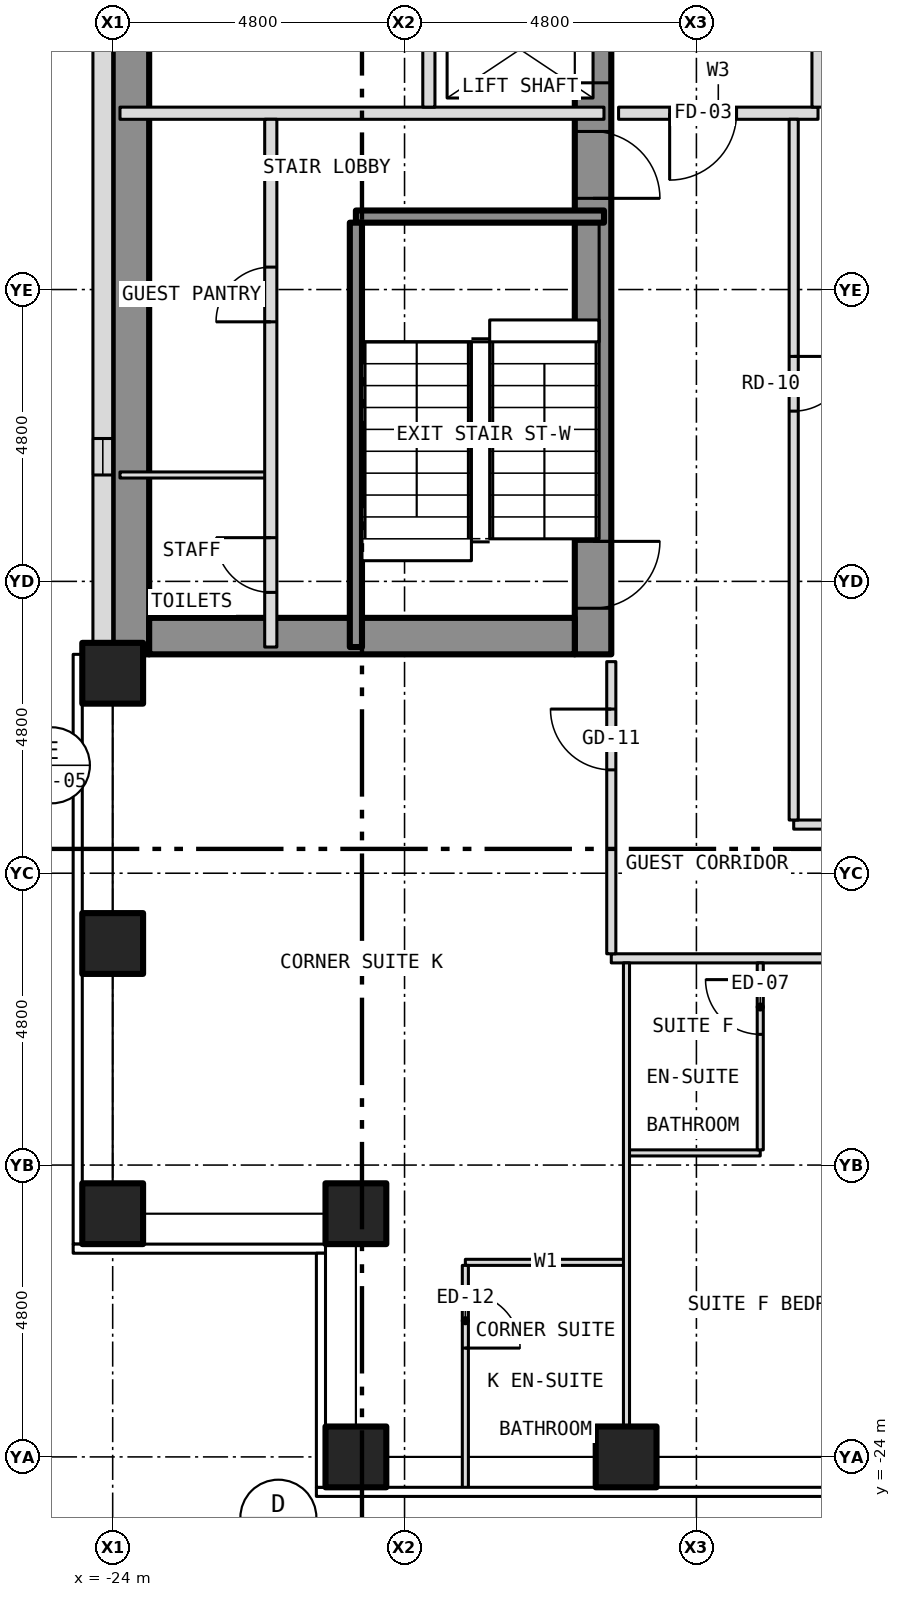
"""IFC4 building model, lengths in metres.
Left out: names, types, materials, properties, quantities, classifications, styles, units other than length and angle.
Written with IfcOpenShell. Run it as: python <this file> out.ifc"""

import sys

from ifc_helpers import new_model, si_unit, direction, frame, frame_2d, origin, origin_2d, place, context, subcontext, project, spatial, rectangle, hollow_rectangle, extrude, element, fill, save


model = new_model("IFC4")
c1 = context("Model", 3, precision=1e-05, world=origin(), true_north=direction((0.0, 1.0)))
c2 = subcontext(c1, "Body", "Model", "MODEL_VIEW")
j1 = project(units=[si_unit("LENGTHUNIT", "METRE"), si_unit("PLANEANGLEUNIT", "RADIAN")], contexts=[c1])
p1 = place(None, origin())
s1 = spatial("IfcSite", under=j1, at=p1, CompositionType="ELEMENT")
p2 = place(p1, origin())
s2 = spatial("IfcBuilding", under=s1, at=p2, CompositionType="ELEMENT")
p3 = place(p2, frame((0.0, 0.0, 42.5)))
s3 = spatial("IfcBuildingStorey", under=s2, at=p3, CompositionType="ELEMENT", Elevation=42.5)
for number, where, z_axis, x_axis in (
    (1, (-20.0, -24.0, -0.15), (0.0, 0.0, 1.0), (1.0, 0.0, 0.0)),
    (2, (-15.556, -24.0, -0.15), (0.0, 0.0, 1.0), (1.0, 0.0, 0.0)),
    (3, (-24.0, -20.0, -0.15), (0.0, 0.0, 1.0), (1.0, 0.0, 0.0)),
    (4, (-24.0, -15.556, -0.15), (0.0, 0.0, 1.0), (1.0, 0.0, 0.0)),
    (5, (-24.0, -11.111, -0.15), (0.0, 0.0, 1.0), (1.0, 0.0, 0.0)),
    (6, (-20.0, -20.0, -0.15), (0.0, 0.0, 1.0), (1.0, 0.0, 0.0)),
):
    element("IfcColumn", number, at=place(p3, frame(where, z_axis=z_axis, x_axis=x_axis)), inside=s3, PredefinedType="COLUMN", context=c2, shape_type="SweptSolid", body=[
        extrude(hollow_rectangle(XDim=1.0, YDim=1.0, WallThickness=0.06, at=origin_2d()), origin(), (0.0, 0.0, 1.0), 3.5),
    ])
p4 = place(p3, frame((-16.1, -10.8, 0.0), z_axis=(0.0, 0.0, 1.0), x_axis=(0.0, 1.0, 0.0)))
e7 = element("IfcWall", 7, at=p4, inside=s3, PredefinedType="SHEAR", context=c2, shape_type="SweptSolid", body=[
    extrude(rectangle(XDim=21.6, YDim=0.6, at=frame_2d((10.8, 0.0))), origin(), (0.0, 0.0, 1.0), 3.25),
])
p5 = place(p4, frame((9.4, 0.0, 0.0)))
e8 = element("IfcOpeningElement", 8, at=p5, cuts=e7, PredefinedType="OPENING", context=c2, shape_type="SweptSolid", body=[
    extrude(rectangle(XDim=1.1, YDim=2.1, at=frame_2d((0.55, 1.05))), frame((0.0, 0.312, 0.0), z_axis=(0.0, -1.0, 0.0), x_axis=(1.0, 0.0, 0.0)), (0.0, 0.0, 1.0), 0.624),
])
p6 = place(p4, frame((11.5, 0.0, 0.0)))
e9 = element("IfcOpeningElement", 9, at=p6, cuts=e7, PredefinedType="OPENING", context=c2, shape_type="SweptSolid", body=[
    extrude(rectangle(XDim=1.1, YDim=2.1, at=frame_2d((0.55, 1.05))), frame((0.0, 0.312, 0.0), z_axis=(0.0, -1.0, 0.0), x_axis=(1.0, 0.0, 0.0)), (0.0, 0.0, 1.0), 0.624),
])
p7 = place(p4, frame((13.6, 0.0, 0.0)))
e10 = element("IfcOpeningElement", 10, at=p7, cuts=e7, PredefinedType="OPENING", context=c2, shape_type="SweptSolid", body=[
    extrude(rectangle(XDim=1.1, YDim=2.1, at=frame_2d((0.55, 1.05))), frame((0.0, 0.312, 0.0), z_axis=(0.0, -1.0, 0.0), x_axis=(1.0, 0.0, 0.0)), (0.0, 0.0, 1.0), 0.624),
])
p8 = place(p4, frame((15.7, 0.0, 0.0)))
e11 = element("IfcOpeningElement", 11, at=p8, cuts=e7, PredefinedType="OPENING", context=c2, shape_type="SweptSolid", body=[
    extrude(rectangle(XDim=1.1, YDim=2.1, at=frame_2d((0.55, 1.05))), frame((0.0, 0.312, 0.0), z_axis=(0.0, -1.0, 0.0), x_axis=(1.0, 0.0, 0.0)), (0.0, 0.0, 1.0), 0.624),
])
p9 = place(p4, frame((17.8, 0.0, 0.0)))
e12 = element("IfcOpeningElement", 12, at=p9, cuts=e7, PredefinedType="OPENING", context=c2, shape_type="SweptSolid", body=[
    extrude(rectangle(XDim=1.1, YDim=2.1, at=frame_2d((0.55, 1.05))), frame((0.0, 0.312, 0.0), z_axis=(0.0, -1.0, 0.0), x_axis=(1.0, 0.0, 0.0)), (0.0, 0.0, 1.0), 0.624),
])
p10 = place(p4, frame((0.758, 0.0, 0.0)))
e13 = element("IfcOpeningElement", 13, at=p10, cuts=e7, PredefinedType="OPENING", context=c2, shape_type="SweptSolid", body=[
    extrude(rectangle(XDim=1.1, YDim=2.1, at=frame_2d((0.55, 1.05))), frame((0.0, 0.312, 0.0), z_axis=(0.0, -1.0, 0.0), x_axis=(1.0, 0.0, 0.0)), (0.0, 0.0, 1.0), 0.624),
])
p11 = place(p4, frame((7.5, 0.0, 0.0)))
e14 = element("IfcOpeningElement", 14, at=p11, cuts=e7, PredefinedType="OPENING", context=c2, shape_type="SweptSolid", body=[
    extrude(rectangle(XDim=1.1, YDim=2.1, at=frame_2d((0.55, 1.05))), frame((0.0, 0.312, 0.0), z_axis=(0.0, -1.0, 0.0), x_axis=(1.0, 0.0, 0.0)), (0.0, 0.0, 1.0), 0.624),
])
p12 = place(p3, frame((-23.7, -10.8, 0.0), z_axis=(0.0, 0.0, 1.0), x_axis=(0.0, 1.0, 0.0)))
e15 = element("IfcWall", 15, at=p12, inside=s3, PredefinedType="SHEAR", context=c2, shape_type="SweptSolid", body=[
    extrude(rectangle(XDim=21.6, YDim=0.6, at=frame_2d((10.8, 0.0))), origin(), (0.0, 0.0, 1.0), 3.25),
])
p13 = place(p3, frame((-23.4, -10.5, 0.0), z_axis=(0.0, 0.0, 1.0), x_axis=(1.0, 0.0, 0.0)))
e16 = element("IfcWall", 16, at=p13, inside=s3, PredefinedType="SHEAR", context=c2, shape_type="SweptSolid", body=[
    extrude(rectangle(XDim=7.0, YDim=0.6, at=frame_2d((3.5, 0.0))), origin(), (0.0, 0.0, 1.0), 3.25),
])
p14 = place(p3, frame((-24.163, 10.8, 0.0), z_axis=(0.0, 0.0, 1.0), x_axis=(0.0, -1.0, 0.0)))
e17 = element("IfcWall", 17, at=p14, inside=s3, PredefinedType="SOLIDWALL", context=c2, shape_type="SweptSolid", body=[
    extrude(rectangle(XDim=21.6, YDim=0.325, at=frame_2d((10.8, 0.0))), origin(), (0.0, 0.0, 1.0), 3.5),
])
p15 = place(p14, frame((18.05, 0.0, 1.0)))
e18 = element("IfcOpeningElement", 18, at=p15, cuts=e17, PredefinedType="OPENING", context=c2, shape_type="SweptSolid", body=[
    extrude(rectangle(XDim=0.6, YDim=1.5, at=frame_2d((0.3, 0.75))), frame((0.0, 0.175, 0.0), z_axis=(0.0, -1.0, 0.0), x_axis=(1.0, 0.0, 0.0)), (0.0, 0.0, 1.0), 0.349),
])
p16 = place(p3, frame((-18.2, -20.8, 0.0), z_axis=(0.0, 0.0, 1.0), x_axis=(1.0, 0.0, 0.0)))
e19 = element("IfcWall", 19, at=p16, inside=s3, PredefinedType="PARTITIONING", context=c2, shape_type="SweptSolid", body=[
    extrude(rectangle(XDim=2.65, YDim=0.1, at=frame_2d((1.325, 0.0))), origin(), (0.0, 0.0, 1.0), 3.35),
])
p17 = place(p3, frame((-15.55, -19.0, 0.0), z_axis=(0.0, 0.0, 1.0), x_axis=(1.0, 0.0, 0.0)))
e20 = element("IfcWall", 20, at=p17, inside=s3, PredefinedType="PARTITIONING", context=c2, shape_type="SweptSolid", body=[
    extrude(rectangle(XDim=2.2, YDim=0.1, at=frame_2d((1.1, 0.0))), origin(), (0.0, 0.0, 1.0), 3.35),
])
p18 = place(p3, frame((-15.8, -15.8, 0.0), z_axis=(0.0, 0.0, 1.0), x_axis=(1.0, 0.0, 0.0)))
e21 = element("IfcWall", 21, at=p18, inside=s3, PredefinedType="PARTITIONING", context=c2, shape_type="SweptSolid", body=[
    extrude(rectangle(XDim=31.6, YDim=0.15, at=frame_2d((15.8, 0.0))), origin(), (0.0, 0.0, 1.0), 3.35),
])
p19 = place(p18, frame((6.633, 0.0, 0.0)))
e22 = element("IfcOpeningElement", 22, at=p19, cuts=e21, PredefinedType="OPENING", context=c2, shape_type="SweptSolid", body=[
    extrude(rectangle(XDim=1.0, YDim=2.1, at=frame_2d((0.5, 1.05))), frame((0.0, 0.087, 0.0), z_axis=(0.0, -1.0, 0.0), x_axis=(1.0, 0.0, 0.0)), (0.0, 0.0, 1.0), 0.174),
])
p20 = place(p18, frame((11.956, 0.0, 0.0)))
e23 = element("IfcOpeningElement", 23, at=p20, cuts=e21, PredefinedType="OPENING", context=c2, shape_type="SweptSolid", body=[
    extrude(rectangle(XDim=1.0, YDim=2.1, at=frame_2d((0.5, 1.05))), frame((0.0, 0.087, 0.0), z_axis=(0.0, -1.0, 0.0), x_axis=(1.0, 0.0, 0.0)), (0.0, 0.0, 1.0), 0.174),
])
p21 = place(p18, frame((16.4, 0.0, 0.0)))
e24 = element("IfcOpeningElement", 24, at=p21, cuts=e21, PredefinedType="OPENING", context=c2, shape_type="SweptSolid", body=[
    extrude(rectangle(XDim=1.0, YDim=2.1, at=frame_2d((0.5, 1.05))), frame((0.0, 0.087, 0.0), z_axis=(0.0, -1.0, 0.0), x_axis=(1.0, 0.0, 0.0)), (0.0, 0.0, 1.0), 0.174),
])
p22 = place(p18, frame((21.956, 0.0, 0.0)))
e25 = element("IfcOpeningElement", 25, at=p22, cuts=e21, PredefinedType="OPENING", context=c2, shape_type="SweptSolid", body=[
    extrude(rectangle(XDim=1.0, YDim=2.1, at=frame_2d((0.5, 1.05))), frame((0.0, 0.087, 0.0), z_axis=(0.0, -1.0, 0.0), x_axis=(1.0, 0.0, 0.0)), (0.0, 0.0, 1.0), 0.174),
])
p23 = place(p18, frame((28.623, 0.0, 0.0)))
e26 = element("IfcOpeningElement", 26, at=p23, cuts=e21, PredefinedType="OPENING", context=c2, shape_type="SweptSolid", body=[
    extrude(rectangle(XDim=1.0, YDim=2.1, at=frame_2d((0.5, 1.05))), frame((0.0, 0.087, 0.0), z_axis=(0.0, -1.0, 0.0), x_axis=(1.0, 0.0, 0.0)), (0.0, 0.0, 1.0), 0.174),
])
p24 = place(p3, frame((-12.8, -13.6, 0.0), z_axis=(0.0, 0.0, 1.0), x_axis=(1.0, 0.0, 0.0)))
e27 = element("IfcWall", 27, at=p24, inside=s3, PredefinedType="PARTITIONING", context=c2, shape_type="SweptSolid", body=[
    extrude(rectangle(XDim=25.6, YDim=0.15, at=frame_2d((12.8, 0.0))), origin(), (0.0, 0.0, 1.0), 3.35),
])
p25 = place(p24, frame((12.35, 0.0, 0.0)))
e28 = element("IfcOpeningElement", 28, at=p25, cuts=e27, PredefinedType="OPENING", context=c2, shape_type="SweptSolid", body=[
    extrude(rectangle(XDim=0.9, YDim=2.1, at=frame_2d((0.45, 1.05))), frame((0.0, 0.087, 0.0), z_axis=(0.0, -1.0, 0.0), x_axis=(1.0, 0.0, 0.0)), (0.0, 0.0, 1.0), 0.174),
])
p26 = place(p3, frame((-23.88, -7.85, 0.0), z_axis=(0.0, 0.0, 1.0), x_axis=(1.0, 0.0, 0.0)))
e29 = element("IfcWall", 29, at=p26, inside=s3, PredefinedType="PARTITIONING", context=c2, shape_type="SweptSolid", body=[
    extrude(rectangle(XDim=2.48, YDim=0.1, at=frame_2d((1.24, 0.0))), origin(), (0.0, 0.0, 1.0), 3.25),
])
p27 = place(p3, frame((-20.0, -3.6, 0.0), z_axis=(0.0, 0.0, 1.0), x_axis=(1.0, 0.0, 0.0)))
e30 = element("IfcWall", 30, at=p27, inside=s3, PredefinedType="SHEAR", context=c2, shape_type="SweptSolid", body=[
    extrude(rectangle(XDim=4.08, YDim=0.2, at=frame_2d((2.04, 0.0))), origin(), (0.0, 0.0, 1.0), 3.25),
])
p28 = place(p3, frame((-23.88, -1.9, 0.0), z_axis=(0.0, 0.0, 1.0), x_axis=(1.0, 0.0, 0.0)))
e31 = element("IfcWall", 31, at=p28, inside=s3, PredefinedType="PARTITIONING", context=c2, shape_type="SweptSolid", body=[
    extrude(rectangle(XDim=7.96, YDim=0.2, at=frame_2d((3.98, 0.0))), origin(), (0.0, 0.0, 1.0), 3.25),
])
p29 = place(p3, frame((-15.68, -1.9, 0.0), z_axis=(0.0, 0.0, 1.0), x_axis=(1.0, 0.0, 0.0)))
e32 = element("IfcWall", 32, at=p29, inside=s3, PredefinedType="PARTITIONING", context=c2, shape_type="SweptSolid", body=[
    extrude(rectangle(XDim=3.28, YDim=0.2, at=frame_2d((1.64, 0.0))), origin(), (0.0, 0.0, 1.0), 3.35),
])
p30 = place(p29, frame((0.84, 0.0, 0.0)))
e33 = element("IfcOpeningElement", 33, at=p30, cuts=e32, PredefinedType="OPENING", context=c2, shape_type="SweptSolid", body=[
    extrude(rectangle(XDim=1.1, YDim=2.1, at=frame_2d((0.55, 1.05))), frame((0.0, 0.112, 0.0), z_axis=(0.0, -1.0, 0.0), x_axis=(1.0, 0.0, 0.0)), (0.0, 0.0, 1.0), 0.224),
])
p31 = place(p3, frame((-21.4, -10.68, 0.0), z_axis=(0.0, 0.0, 1.0), x_axis=(0.0, 1.0, 0.0)))
e34 = element("IfcWall", 34, at=p31, inside=s3, PredefinedType="PARTITIONING", context=c2, shape_type="SweptSolid", body=[
    extrude(rectangle(XDim=8.68, YDim=0.2, at=frame_2d((4.34, 0.0))), origin(), (0.0, 0.0, 1.0), 3.25),
])
p32 = place(p31, frame((0.899, 0.0, 0.0)))
e35 = element("IfcOpeningElement", 35, at=p32, cuts=e34, PredefinedType="OPENING", context=c2, shape_type="SweptSolid", body=[
    extrude(rectangle(XDim=0.9, YDim=2.1, at=frame_2d((0.45, 1.05))), frame((0.0, 0.112, 0.0), z_axis=(0.0, -1.0, 0.0), x_axis=(1.0, 0.0, 0.0)), (0.0, 0.0, 1.0), 0.224),
])
p33 = place(p31, frame((5.349, 0.0, 0.0)))
e36 = element("IfcOpeningElement", 36, at=p33, cuts=e34, PredefinedType="OPENING", context=c2, shape_type="SweptSolid", body=[
    extrude(rectangle(XDim=0.9, YDim=2.1, at=frame_2d((0.45, 1.05))), frame((0.0, 0.112, 0.0), z_axis=(0.0, -1.0, 0.0), x_axis=(1.0, 0.0, 0.0)), (0.0, 0.0, 1.0), 0.224),
])
p34 = place(p3, frame((-20.0, -10.68, 0.0), z_axis=(0.0, 0.0, 1.0), x_axis=(0.0, 1.0, 0.0)))
e37 = element("IfcWall", 37, at=p34, inside=s3, PredefinedType="SHEAR", context=c2, shape_type="SweptSolid", body=[
    extrude(rectangle(XDim=6.98, YDim=0.2, at=frame_2d((3.49, 0.0))), origin(), (0.0, 0.0, 1.0), 3.25),
])
p35 = place(p3, frame((-18.8, -1.8, 0.0), z_axis=(0.0, 0.0, 1.0), x_axis=(0.0, 1.0, 0.0)))
e38 = element("IfcWall", 38, at=p35, inside=s3, PredefinedType="PARTITIONING", context=c2, shape_type="SweptSolid", body=[
    extrude(rectangle(XDim=12.48, YDim=0.2, at=frame_2d((6.24, 0.0))), origin(), (0.0, 0.0, 1.0), 3.25),
])
p36 = place(p3, frame((-18.2, -24.53, 0.0), z_axis=(0.0, 0.0, 1.0), x_axis=(0.0, 1.0, 0.0)))
e39 = element("IfcWall", 39, at=p36, inside=s3, PredefinedType="PARTITIONING", context=c2, shape_type="SweptSolid", body=[
    extrude(rectangle(XDim=3.68, YDim=0.1, at=frame_2d((1.84, 0.0))), origin(), (0.0, 0.0, 1.0), 3.35),
])
p37 = place(p36, frame((2.32, 0.0, 0.0)))
e40 = element("IfcOpeningElement", 40, at=p37, cuts=e39, PredefinedType="OPENING", context=c2, shape_type="SweptSolid", body=[
    extrude(rectangle(XDim=0.9, YDim=2.1, at=frame_2d((0.45, 1.05))), frame((0.0, 0.062, 0.0), z_axis=(0.0, -1.0, 0.0), x_axis=(1.0, 0.0, 0.0)), (0.0, 0.0, 1.0), 0.124),
])
p38 = place(p3, frame((-15.8, -15.725, 0.0), z_axis=(0.0, 0.0, 1.0), x_axis=(0.0, 1.0, 0.0)))
e41 = element("IfcWall", 41, at=p38, inside=s3, PredefinedType="PARTITIONING", context=c2, shape_type="SweptSolid", body=[
    extrude(rectangle(XDim=4.805, YDim=0.15, at=frame_2d((2.403, 0.0))), origin(), (0.0, 0.0, 1.0), 3.35),
])
p39 = place(p38, frame((3.025, 0.0, 0.0)))
e42 = element("IfcOpeningElement", 42, at=p39, cuts=e41, PredefinedType="OPENING", context=c2, shape_type="SweptSolid", body=[
    extrude(rectangle(XDim=1.0, YDim=2.1, at=frame_2d((0.5, 1.05))), frame((0.0, 0.087, 0.0), z_axis=(0.0, -1.0, 0.0), x_axis=(1.0, 0.0, 0.0)), (0.0, 0.0, 1.0), 0.174),
])
p40 = place(p3, frame((-15.55, -23.88, 0.0), z_axis=(0.0, 0.0, 1.0), x_axis=(0.0, 1.0, 0.0)))
e43 = element("IfcWall", 43, at=p40, inside=s3, PredefinedType="PARTITIONING", context=c2, shape_type="SweptSolid", body=[
    extrude(rectangle(XDim=8.005, YDim=0.1, at=frame_2d((4.002, 0.0))), origin(), (0.0, 0.0, 1.0), 3.35),
])
p41 = place(p3, frame((-13.35, -18.95, 0.0), z_axis=(0.0, 0.0, 1.0), x_axis=(0.0, 1.0, 0.0)))
e44 = element("IfcWall", 44, at=p41, inside=s3, PredefinedType="PARTITIONING", context=c2, shape_type="SweptSolid", body=[
    extrude(rectangle(XDim=3.075, YDim=0.1, at=frame_2d((1.538, 0.0))), origin(), (0.0, 0.0, 1.0), 3.35),
])
p42 = place(p41, frame((1.9, 0.0, 0.0)))
e45 = element("IfcOpeningElement", 45, at=p42, cuts=e44, PredefinedType="OPENING", context=c2, shape_type="SweptSolid", body=[
    extrude(rectangle(XDim=0.9, YDim=2.1, at=frame_2d((0.45, 1.05))), frame((0.0, 0.062, 0.0), z_axis=(0.0, -1.0, 0.0), x_axis=(1.0, 0.0, 0.0)), (0.0, 0.0, 1.0), 0.124),
])
p43 = place(p3, frame((-12.8, -13.525, 0.0), z_axis=(0.0, 0.0, 1.0), x_axis=(0.0, 1.0, 0.0)))
e46 = element("IfcWall", 46, at=p43, inside=s3, PredefinedType="PARTITIONING", context=c2, shape_type="SweptSolid", body=[
    extrude(rectangle(XDim=11.525, YDim=0.15, at=frame_2d((5.762, 0.0))), origin(), (0.0, 0.0, 1.0), 3.35),
])
p44 = place(p43, frame((6.725, 0.0, 0.0)))
e47 = element("IfcOpeningElement", 47, at=p44, cuts=e46, PredefinedType="OPENING", context=c2, shape_type="SweptSolid", body=[
    extrude(rectangle(XDim=0.9, YDim=2.1, at=frame_2d((0.45, 1.05))), frame((0.0, 0.087, 0.0), z_axis=(0.0, -1.0, 0.0), x_axis=(1.0, 0.0, 0.0)), (0.0, 0.0, 1.0), 0.174),
])
p45 = place(p3, frame((-12.4, -1.8, 0.0), z_axis=(0.0, 0.0, 1.0), x_axis=(0.0, 1.0, 0.0)))
e48 = element("IfcWall", 48, at=p45, inside=s3, PredefinedType="PARTITIONING", context=c2, shape_type="SweptSolid", body=[
    extrude(rectangle(XDim=4.0, YDim=0.2, at=frame_2d((2.0, 0.0))), origin(), (0.0, 0.0, 1.0), 3.35),
])
p46 = place(p15, origin())
e49 = element("IfcWindow", 49, at=p46, inside=s3, PartitioningType="SINGLE_PANEL", PredefinedType="WINDOW", context=c2, shape_type="SweptSolid", body=[
    extrude(rectangle(XDim=0.6, YDim=1.5, at=frame_2d((0.3, 0.75))), frame((0.0, -0.073, 0.0), z_axis=(0.0, -1.0, 0.0), x_axis=(1.0, 0.0, 0.0)), (0.0, 0.0, 1.0), 0.06),
])
fill(e18, e49)
p47 = place(p5, origin())
e50 = element("IfcDoor", 50, at=p47, inside=s3, OperationType="SLIDING_TO_LEFT", PredefinedType="DOOR", context=c2, shape_type="SweptSolid", body=[
    extrude(rectangle(XDim=1.1, YDim=2.1, at=frame_2d((0.55, 1.05))), frame((0.0, 0.025, 0.0), z_axis=(0.0, -1.0, 0.0), x_axis=(1.0, 0.0, 0.0)), (0.0, 0.0, 1.0), 0.05),
])
fill(e8, e50)
p48 = place(p10, origin())
e51 = element("IfcDoor", 51, at=p48, inside=s3, OperationType="SINGLE_SWING_RIGHT", PredefinedType="DOOR", context=c2, shape_type="SweptSolid", body=[
    extrude(rectangle(XDim=1.1, YDim=2.1, at=frame_2d((0.55, 1.05))), frame((0.0, 0.025, 0.0), z_axis=(0.0, -1.0, 0.0), x_axis=(1.0, 0.0, 0.0)), (0.0, 0.0, 1.0), 0.05),
])
fill(e13, e51)
p49 = place(p11, origin())
e52 = element("IfcDoor", 52, at=p49, inside=s3, OperationType="SINGLE_SWING_LEFT", PredefinedType="DOOR", context=c2, shape_type="SweptSolid", body=[
    extrude(rectangle(XDim=1.1, YDim=2.1, at=frame_2d((0.55, 1.05))), frame((0.0, 0.025, 0.0), z_axis=(0.0, -1.0, 0.0), x_axis=(1.0, 0.0, 0.0)), (0.0, 0.0, 1.0), 0.05),
])
fill(e14, e52)
p50 = place(p32, origin())
e53 = element("IfcDoor", 53, at=p50, inside=s3, OperationType="SINGLE_SWING_RIGHT", PredefinedType="DOOR", context=c2, shape_type="SweptSolid", body=[
    extrude(rectangle(XDim=0.9, YDim=2.1, at=frame_2d((0.45, 1.05))), frame((0.0, 0.025, 0.0), z_axis=(0.0, -1.0, 0.0), x_axis=(1.0, 0.0, 0.0)), (0.0, 0.0, 1.0), 0.05),
])
fill(e35, e53)
p51 = place(p33, origin())
e54 = element("IfcDoor", 54, at=p51, inside=s3, OperationType="SINGLE_SWING_LEFT", PredefinedType="DOOR", context=c2, shape_type="SweptSolid", body=[
    extrude(rectangle(XDim=0.9, YDim=2.1, at=frame_2d((0.45, 1.05))), frame((0.0, 0.025, 0.0), z_axis=(0.0, -1.0, 0.0), x_axis=(1.0, 0.0, 0.0)), (0.0, 0.0, 1.0), 0.05),
])
fill(e36, e54)
p52 = place(p30, origin())
e55 = element("IfcDoor", 55, at=p52, inside=s3, OperationType="SINGLE_SWING_LEFT", PredefinedType="DOOR", context=c2, shape_type="SweptSolid", body=[
    extrude(rectangle(XDim=1.1, YDim=2.1, at=frame_2d((0.55, 1.05))), frame((0.0, 0.025, 0.0), z_axis=(0.0, -1.0, 0.0), x_axis=(1.0, 0.0, 0.0)), (0.0, 0.0, 1.0), 0.05),
])
fill(e33, e55)
p53 = place(p42, origin())
e56 = element("IfcDoor", 56, at=p53, inside=s3, OperationType="SINGLE_SWING_RIGHT", PredefinedType="DOOR", context=c2, shape_type="SweptSolid", body=[
    extrude(rectangle(XDim=0.9, YDim=2.1, at=frame_2d((0.45, 1.05))), frame((0.0, 0.025, 0.0), z_axis=(0.0, -1.0, 0.0), x_axis=(1.0, 0.0, 0.0)), (0.0, 0.0, 1.0), 0.05),
])
fill(e45, e56)
p54 = place(p37, origin())
e57 = element("IfcDoor", 57, at=p54, inside=s3, OperationType="SINGLE_SWING_LEFT", PredefinedType="DOOR", context=c2, shape_type="SweptSolid", body=[
    extrude(rectangle(XDim=0.9, YDim=2.1, at=frame_2d((0.45, 1.05))), frame((0.0, 0.025, 0.0), z_axis=(0.0, -1.0, 0.0), x_axis=(1.0, 0.0, 0.0)), (0.0, 0.0, 1.0), 0.05),
])
fill(e40, e57)
p55 = place(p39, origin())
e58 = element("IfcDoor", 58, at=p55, inside=s3, OperationType="SINGLE_SWING_RIGHT", PredefinedType="DOOR", context=c2, shape_type="SweptSolid", body=[
    extrude(rectangle(XDim=1.0, YDim=2.1, at=frame_2d((0.5, 1.05))), frame((0.0, 0.025, 0.0), z_axis=(0.0, -1.0, 0.0), x_axis=(1.0, 0.0, 0.0)), (0.0, 0.0, 1.0), 0.05),
])
fill(e42, e58)
p56 = place(p44, origin())
e59 = element("IfcDoor", 59, at=p56, inside=s3, OperationType="SINGLE_SWING_RIGHT", PredefinedType="DOOR", context=c2, shape_type="SweptSolid", body=[
    extrude(rectangle(XDim=0.9, YDim=2.1, at=frame_2d((0.45, 1.05))), frame((0.0, 0.025, 0.0), z_axis=(0.0, -1.0, 0.0), x_axis=(1.0, 0.0, 0.0)), (0.0, 0.0, 1.0), 0.05),
])
fill(e47, e59)
save(model, sys.argv[1])
